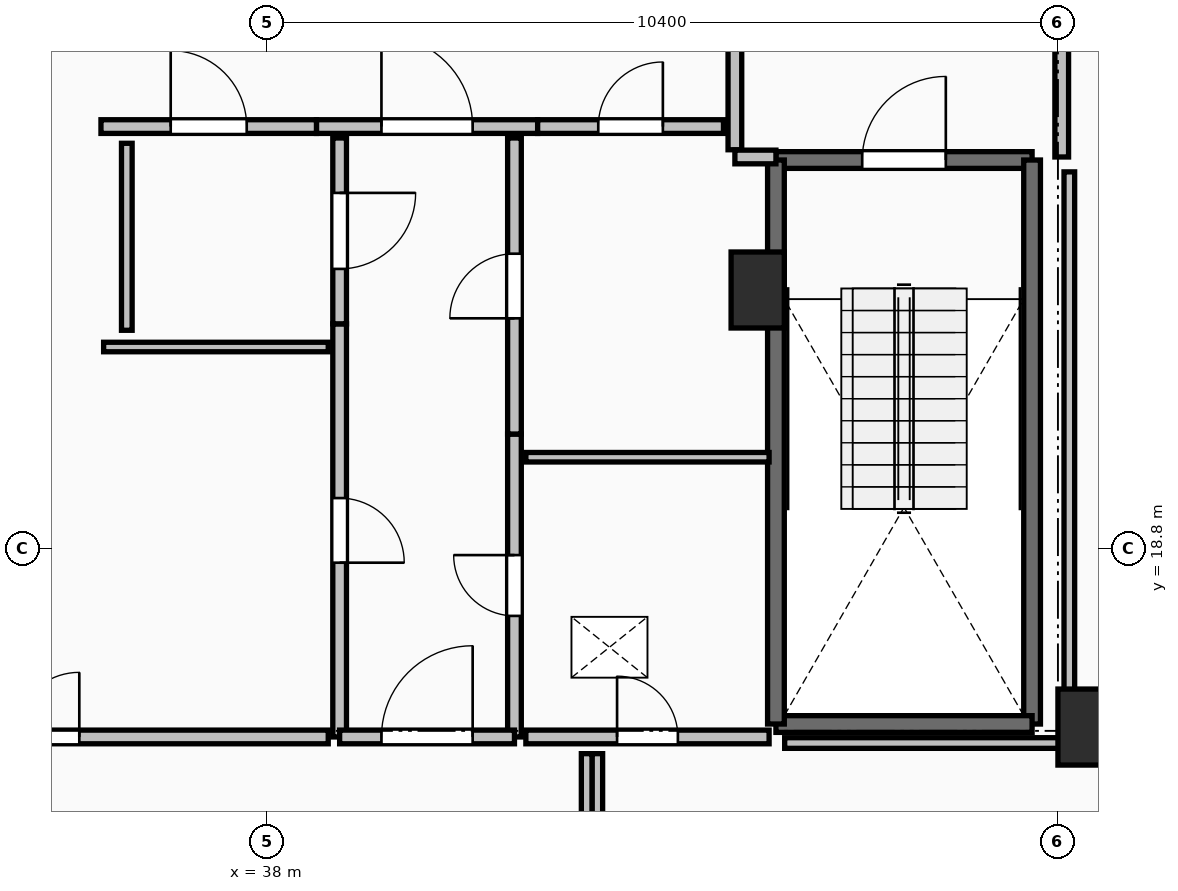
"""IFC4 building model, lengths in metres.
Left out: names, types, materials, properties, quantities, classifications, styles, units other than length and angle.
Written with IfcOpenShell. Run it as: python <this file> out.ifc"""

import sys

from ifc_helpers import new_model, si_unit, direction, frame, frame_2d, origin, origin_2d, place, context, subcontext, project, spatial, rectangle, extrude, element, fill, save


model = new_model("IFC4")
c1 = context("Model", 3, precision=1e-05, world=origin(), true_north=direction((0.0, 1.0)))
c2 = subcontext(c1, "Body", "Model", "MODEL_VIEW")
j1 = project(units=[si_unit("LENGTHUNIT", "METRE"), si_unit("PLANEANGLEUNIT", "RADIAN")], contexts=[c1])
p1 = place(None, origin())
s1 = spatial("IfcSite", under=j1, at=p1, CompositionType="ELEMENT")
p2 = place(p1, origin())
s2 = spatial("IfcBuilding", under=s1, at=p2, CompositionType="ELEMENT")
p3 = place(p2, frame((0.0, 0.0, 269.75)))
s3 = spatial("IfcBuildingStorey", under=s2, at=p3, CompositionType="ELEMENT", Elevation=269.75)
for number, where, z_axis, x_axis in (
    (1, (48.75, 16.45, 0.0), (0.0, 0.0, 1.0), (1.0, 0.0, 0.0)),
    (2, (44.45, 22.2, 0.0), (0.0, 0.0, 1.0), (1.0, 0.0, 0.0)),
):
    element("IfcColumn", number, at=place(p3, frame(where, z_axis=z_axis, x_axis=x_axis)), inside=s3, PredefinedType="PILASTER", context=c2, shape_type="SweptSolid", body=[
        extrude(rectangle(XDim=0.7, YDim=1.0, at=origin_2d()), origin(), (0.0, 0.0, 1.0), 3.55),
    ])
p4 = place(p3, frame((44.69, 23.91, 0.0), z_axis=(0.0, 0.0, 1.0), x_axis=(1.0, 0.0, 0.0)))
e3 = element("IfcWall", 3, at=p4, inside=s3, PredefinedType="SOLIDWALL", context=c2, shape_type="SweptSolid", body=[
    extrude(rectangle(XDim=3.37, YDim=0.22, at=frame_2d((1.685, 0.0))), origin(), (0.0, 0.0, 1.0), 3.29),
])
p5 = place(p4, frame((1.135, 0.0, 0.0)))
e4 = element("IfcOpeningElement", 4, at=p5, cuts=e3, PredefinedType="OPENING", context=c2, shape_type="SweptSolid", body=[
    extrude(rectangle(XDim=1.1, YDim=2.15, at=frame_2d((0.55, 1.075))), frame((0.0, 0.125, 0.0), z_axis=(0.0, -1.0, 0.0), x_axis=(1.0, 0.0, 0.0)), (0.0, 0.0, 1.0), 0.25),
])
p6 = place(p3, frame((48.06, 23.91, 0.0), z_axis=(0.0, 0.0, 1.0), x_axis=(0.0, -1.0, 0.0)))
e5 = element("IfcWall", 5, at=p6, inside=s3, PredefinedType="SOLIDWALL", context=c2, shape_type="SweptSolid", body=[
    extrude(rectangle(XDim=7.42, YDim=0.22, at=frame_2d((3.71, 0.0))), origin(), (0.0, 0.0, 1.0), 3.29),
])
p7 = place(p3, frame((48.06, 16.49, 0.0), z_axis=(0.0, 0.0, 1.0), x_axis=(-1.0, 0.0, 0.0)))
e6 = element("IfcWall", 6, at=p7, inside=s3, PredefinedType="SOLIDWALL", context=c2, shape_type="SweptSolid", body=[
    extrude(rectangle(XDim=3.37, YDim=0.22, at=frame_2d((1.685, 0.0))), origin(), (0.0, 0.0, 1.0), 3.29),
])
p8 = place(p3, frame((44.69, 16.49, 0.0), z_axis=(0.0, 0.0, 1.0), x_axis=(0.0, 1.0, 0.0)))
e7 = element("IfcWall", 7, at=p8, inside=s3, PredefinedType="SOLIDWALL", context=c2, shape_type="SweptSolid", body=[
    extrude(rectangle(XDim=7.42, YDim=0.22, at=frame_2d((3.71, 0.0))), origin(), (0.0, 0.0, 1.0), 3.29),
])
p9 = place(p3, frame((44.15, 27.955, 0.0), z_axis=(0.0, 0.0, 1.0), x_axis=(0.0, -1.0, 0.0)))
e8 = element("IfcWall", 8, at=p9, inside=s3, PredefinedType="PARTITIONING", context=c2, shape_type="SweptSolid", body=[
    extrude(rectangle(XDim=3.91, YDim=0.18, at=frame_2d((1.955, 0.0))), origin(), (0.0, 0.0, 1.0), 3.29),
])
p10 = place(p9, frame((1.355, 0.0, 0.0)))
e9 = element("IfcOpeningElement", 9, at=p10, cuts=e8, PredefinedType="OPENING", context=c2, shape_type="SweptSolid", body=[
    extrude(rectangle(XDim=1.2, YDim=2.15, at=frame_2d((0.6, 1.075))), frame((0.0, 0.105, 0.0), z_axis=(0.0, -1.0, 0.0), x_axis=(1.0, 0.0, 0.0)), (0.0, 0.0, 1.0), 0.21),
])
p11 = place(p3, frame((44.15, 23.95, 0.0), z_axis=(0.0, 0.0, 1.0), x_axis=(1.0, 0.0, 0.0)))
e10 = element("IfcWall", 10, at=p11, inside=s3, PredefinedType="PARTITIONING", context=c2, shape_type="SweptSolid", body=[
    extrude(rectangle(XDim=0.54, YDim=0.18, at=frame_2d((0.27, 0.0))), origin(), (0.0, 0.0, 1.0), 3.29),
])
p12 = place(p3, frame((48.45, 23.95, 0.0), z_axis=(0.0, 0.0, 1.0), x_axis=(0.0, 1.0, 0.0)))
e11 = element("IfcWall", 11, at=p12, inside=s3, PredefinedType="PARTITIONING", context=c2, shape_type="SweptSolid", body=[
    extrude(rectangle(XDim=4.05, YDim=0.18, at=frame_2d((2.025, 0.0))), origin(), (0.0, 0.0, 1.0), 3.29),
])
p13 = place(p12, frame((1.425, 0.0, 0.0)))
e12 = element("IfcOpeningElement", 12, at=p13, cuts=e11, PredefinedType="OPENING", context=c2, shape_type="SweptSolid", body=[
    extrude(rectangle(XDim=1.2, YDim=2.15, at=frame_2d((0.6, 1.075))), frame((0.0, 0.105, 0.0), z_axis=(0.0, -1.0, 0.0), x_axis=(1.0, 0.0, 0.0)), (0.0, 0.0, 1.0), 0.21),
])
p14 = place(p3, frame((38.645, 24.35, 0.0), z_axis=(0.0, 0.0, 1.0), x_axis=(1.0, 0.0, 0.0)))
e13 = element("IfcWall", 13, at=p14, inside=s3, PredefinedType="PARTITIONING", context=c2, shape_type="SweptSolid", body=[
    extrude(rectangle(XDim=2.91, YDim=0.18, at=frame_2d((1.455, 0.0))), origin(), (0.0, 0.0, 1.0), 3.29),
])
p15 = place(p14, frame((0.855, 0.0, 0.0)))
e14 = element("IfcOpeningElement", 14, at=p15, cuts=e13, PredefinedType="OPENING", context=c2, shape_type="SweptSolid", body=[
    extrude(rectangle(XDim=1.2, YDim=2.15, at=frame_2d((0.6, 1.075))), frame((0.0, 0.105, 0.0), z_axis=(0.0, -1.0, 0.0), x_axis=(1.0, 0.0, 0.0)), (0.0, 0.0, 1.0), 0.21),
])
p16 = place(p3, frame((41.555, 24.35, 0.0), z_axis=(0.0, 0.0, 1.0), x_axis=(1.0, 0.0, 0.0)))
e15 = element("IfcWall", 15, at=p16, inside=s3, PredefinedType="PARTITIONING", context=c2, shape_type="SweptSolid", body=[
    extrude(rectangle(XDim=2.445, YDim=0.18, at=frame_2d((1.223, 0.0))), origin(), (0.0, 0.0, 1.0), 3.29),
])
p17 = place(p16, frame((0.798, 0.0, 0.0)))
e16 = element("IfcOpeningElement", 16, at=p17, cuts=e15, PredefinedType="OPENING", context=c2, shape_type="SweptSolid", body=[
    extrude(rectangle(XDim=0.85, YDim=2.1, at=frame_2d((0.425, 1.05))), frame((0.0, 0.105, 0.0), z_axis=(0.0, -1.0, 0.0), x_axis=(1.0, 0.0, 0.0)), (0.0, 0.0, 1.0), 0.21),
])
p18 = place(p3, frame((35.81, 24.35, 0.0), z_axis=(0.0, 0.0, 1.0), x_axis=(1.0, 0.0, 0.0)))
e17 = element("IfcWall", 17, at=p18, inside=s3, PredefinedType="PARTITIONING", context=c2, shape_type="SweptSolid", body=[
    extrude(rectangle(XDim=2.835, YDim=0.18, at=frame_2d((1.417, 0.0))), origin(), (0.0, 0.0, 1.0), 3.29),
])
p19 = place(p18, frame((0.917, 0.0, 0.0)))
e18 = element("IfcOpeningElement", 18, at=p19, cuts=e17, PredefinedType="OPENING", context=c2, shape_type="SweptSolid", body=[
    extrude(rectangle(XDim=1.0, YDim=2.15, at=frame_2d((0.5, 1.075))), frame((0.0, 0.105, 0.0), z_axis=(0.0, -1.0, 0.0), x_axis=(1.0, 0.0, 0.0)), (0.0, 0.0, 1.0), 0.21),
])
p20 = place(p3, frame((41.25, 16.32, 0.0), z_axis=(0.0, 0.0, 1.0), x_axis=(0.0, 1.0, 0.0)))
e19 = element("IfcWall", 19, at=p20, inside=s3, PredefinedType="PARTITIONING", context=c2, shape_type="SweptSolid", body=[
    extrude(rectangle(XDim=3.985, YDim=0.18, at=frame_2d((1.992, 0.0))), origin(), (0.0, 0.0, 1.0), 3.29),
])
p21 = place(p20, frame((1.593, 0.0, 0.0)))
e20 = element("IfcOpeningElement", 20, at=p21, cuts=e19, PredefinedType="OPENING", context=c2, shape_type="SweptSolid", body=[
    extrude(rectangle(XDim=0.8, YDim=2.05, at=frame_2d((0.4, 1.025))), frame((0.0, 0.105, 0.0), z_axis=(0.0, -1.0, 0.0), x_axis=(1.0, 0.0, 0.0)), (0.0, 0.0, 1.0), 0.21),
])
p22 = place(p3, frame((41.25, 20.305, 0.0), z_axis=(0.0, 0.0, 1.0), x_axis=(0.0, 1.0, 0.0)))
e21 = element("IfcWall", 21, at=p22, inside=s3, PredefinedType="PARTITIONING", context=c2, shape_type="SweptSolid", body=[
    extrude(rectangle(XDim=3.895, YDim=0.18, at=frame_2d((1.948, 0.0))), origin(), (0.0, 0.0, 1.0), 2.482),
])
p23 = place(p22, frame((1.522, 0.0, 0.0)))
e22 = element("IfcOpeningElement", 22, at=p23, cuts=e21, PredefinedType="OPENING", context=c2, shape_type="SweptSolid", body=[
    extrude(rectangle(XDim=0.85, YDim=2.1, at=frame_2d((0.425, 1.05))), frame((0.0, 0.105, 0.0), z_axis=(0.0, -1.0, 0.0), x_axis=(1.0, 0.0, 0.0)), (0.0, 0.0, 1.0), 0.21),
])
p24 = place(p3, frame((38.95, 21.755, 0.0), z_axis=(0.0, 0.0, 1.0), x_axis=(0.0, -1.0, 0.0)))
e23 = element("IfcWall", 23, at=p24, inside=s3, PredefinedType="PARTITIONING", context=c2, shape_type="SweptSolid", body=[
    extrude(rectangle(XDim=5.435, YDim=0.18, at=frame_2d((2.717, 0.0))), origin(), (0.0, 0.0, 1.0), 3.29),
])
p25 = place(p24, frame((2.292, 0.0, 0.0)))
e24 = element("IfcOpeningElement", 24, at=p25, cuts=e23, PredefinedType="OPENING", context=c2, shape_type="SweptSolid", body=[
    extrude(rectangle(XDim=0.85, YDim=2.1, at=frame_2d((0.425, 1.05))), frame((0.0, 0.105, 0.0), z_axis=(0.0, -1.0, 0.0), x_axis=(1.0, 0.0, 0.0)), (0.0, 0.0, 1.0), 0.21),
])
p26 = place(p3, frame((38.95, 24.2, 0.0), z_axis=(0.0, 0.0, 1.0), x_axis=(0.0, -1.0, 0.0)))
e25 = element("IfcWall", 25, at=p26, inside=s3, PredefinedType="PARTITIONING", context=c2, shape_type="SweptSolid", body=[
    extrude(rectangle(XDim=2.445, YDim=0.18, at=frame_2d((1.223, 0.0))), origin(), (0.0, 0.0, 1.0), 2.482),
])
p27 = place(p26, frame((0.722, 0.0, 0.0)))
e26 = element("IfcOpeningElement", 26, at=p27, cuts=e25, PredefinedType="OPENING", context=c2, shape_type="SweptSolid", body=[
    extrude(rectangle(XDim=1.0, YDim=2.15, at=frame_2d((0.5, 1.075))), frame((0.0, 0.105, 0.0), z_axis=(0.0, -1.0, 0.0), x_axis=(1.0, 0.0, 0.0)), (0.0, 0.0, 1.0), 0.21),
])
p28 = place(p3, frame((38.95, 16.32, 0.0), z_axis=(0.0, 0.0, 1.0), x_axis=(1.0, 0.0, 0.0)))
e27 = element("IfcWall", 27, at=p28, inside=s3, PredefinedType="PARTITIONING", context=c2, shape_type="SweptSolid", body=[
    extrude(rectangle(XDim=2.3, YDim=0.18, at=frame_2d((1.15, 0.0))), origin(), (0.0, 0.0, 1.0), 3.29),
])
p29 = place(p28, frame((0.55, 0.0, 0.0)))
e28 = element("IfcOpeningElement", 28, at=p29, cuts=e27, PredefinedType="OPENING", context=c2, shape_type="SweptSolid", body=[
    extrude(rectangle(XDim=1.2, YDim=2.15, at=frame_2d((0.6, 1.075))), frame((0.0, 0.105, 0.0), z_axis=(0.0, -1.0, 0.0), x_axis=(1.0, 0.0, 0.0)), (0.0, 0.0, 1.0), 0.21),
])
p30 = place(p3, frame((44.6, 20.0, 0.0), z_axis=(0.0, 0.0, 1.0), x_axis=(-1.0, 0.0, 0.0)))
e29 = element("IfcWall", 29, at=p30, inside=s3, PredefinedType="PARTITIONING", context=c2, shape_type="SweptSolid", body=[
    extrude(rectangle(XDim=3.2, YDim=0.125, at=frame_2d((1.6, 0.0))), origin(), (0.0, 0.0, 1.0), 3.29),
])
p31 = place(p3, frame((41.4, 16.32, 0.0), z_axis=(0.0, 0.0, 1.0), x_axis=(1.0, 0.0, 0.0)))
e30 = element("IfcWall", 30, at=p31, inside=s3, PredefinedType="PARTITIONING", context=c2, shape_type="SweptSolid", body=[
    extrude(rectangle(XDim=3.2, YDim=0.18, at=frame_2d((1.6, 0.0))), origin(), (0.0, 0.0, 1.0), 3.29),
])
p32 = place(p31, frame((1.2, 0.0, 0.0)))
e31 = element("IfcOpeningElement", 31, at=p32, cuts=e30, PredefinedType="OPENING", context=c2, shape_type="SweptSolid", body=[
    extrude(rectangle(XDim=0.8, YDim=2.05, at=frame_2d((0.4, 1.025))), frame((0.0, 0.105, 0.0), z_axis=(0.0, -1.0, 0.0), x_axis=(1.0, 0.0, 0.0)), (0.0, 0.0, 1.0), 0.21),
])
p33 = place(p3, frame((38.8, 21.45, 0.0), z_axis=(0.0, 0.0, 1.0), x_axis=(-1.0, 0.0, 0.0)))
e32 = element("IfcWall", 32, at=p33, inside=s3, PredefinedType="PARTITIONING", context=c2, shape_type="SweptSolid", body=[
    extrude(rectangle(XDim=2.955, YDim=0.125, at=frame_2d((1.478, 0.0))), origin(), (0.0, 0.0, 1.0), 3.29),
])
p34 = place(p3, frame((31.4, 16.32, 0.0), z_axis=(0.0, 0.0, 1.0), x_axis=(1.0, 0.0, 0.0)))
e33 = element("IfcWall", 33, at=p34, inside=s3, PredefinedType="PARTITIONING", context=c2, shape_type="SweptSolid", body=[
    extrude(rectangle(XDim=7.4, YDim=0.18, at=frame_2d((3.7, 0.0))), origin(), (0.0, 0.0, 1.0), 3.29),
])
p35 = place(p34, frame((3.275, 0.0, 0.0)))
e34 = element("IfcOpeningElement", 34, at=p35, cuts=e33, PredefinedType="OPENING", context=c2, shape_type="SweptSolid", body=[
    extrude(rectangle(XDim=0.85, YDim=2.1, at=frame_2d((0.425, 1.05))), frame((0.0, 0.105, 0.0), z_axis=(0.0, -1.0, 0.0), x_axis=(1.0, 0.0, 0.0)), (0.0, 0.0, 1.0), 0.21),
])
p36 = place(p3, frame((36.15, 24.13, 0.0), z_axis=(0.0, 0.0, 1.0), x_axis=(0.0, -1.0, 0.0)))
e35 = element("IfcWall", 35, at=p36, inside=s3, PredefinedType="PARTITIONING", context=c2, shape_type="SweptSolid", body=[
    extrude(rectangle(XDim=2.46, YDim=0.14, at=frame_2d((1.23, 0.0))), origin(), (0.0, 0.0, 1.0), 2.482),
])
p37 = place(p3, frame((42.34, 14.27, 0.0), z_axis=(0.0, 0.0, 1.0), x_axis=(0.0, 1.0, 0.0)))
e36 = element("IfcWall", 36, at=p37, inside=s3, PredefinedType="PARTITIONING", context=c2, shape_type="SweptSolid", body=[
    extrude(rectangle(XDim=1.83, YDim=0.14, at=frame_2d((0.915, 0.0))), origin(), (0.0, 0.0, 1.0), 3.29),
])
p38 = place(p3, frame((44.805, 16.24, 0.0), z_axis=(0.0, 0.0, 1.0), x_axis=(1.0, 0.0, 0.0)))
e37 = element("IfcWall", 37, at=p38, inside=s3, PredefinedType="PARTITIONING", context=c2, shape_type="SweptSolid", body=[
    extrude(rectangle(XDim=3.745, YDim=0.14, at=frame_2d((1.873, 0.0))), origin(), (0.0, 0.0, 1.0), 2.482),
])
p39 = place(p3, frame((48.55, 16.24, 0.0), z_axis=(0.0, 0.0, 1.0), x_axis=(0.0, 1.0, 0.0)))
e38 = element("IfcWall", 38, at=p39, inside=s3, PredefinedType="PARTITIONING", context=c2, shape_type="SweptSolid", body=[
    extrude(rectangle(XDim=7.514, YDim=0.14, at=frame_2d((3.757, 0.0))), origin(), (0.0, 0.0, 1.0), 2.482),
])
p40 = place(p3, frame((42.2, 16.1, 0.0), z_axis=(0.0, 0.0, 1.0), x_axis=(0.0, -1.0, 0.0)))
e39 = element("IfcWall", 39, at=p40, inside=s3, PredefinedType="PARTITIONING", context=c2, shape_type="SweptSolid", body=[
    extrude(rectangle(XDim=1.83, YDim=0.14, at=frame_2d((0.915, 0.0))), origin(), (0.0, 0.0, 1.0), 3.29),
])
p41 = place(p5, origin())
e40 = element("IfcDoor", 40, at=p41, inside=s3, OperationType="SINGLE_SWING_RIGHT", PredefinedType="DOOR", context=c2, shape_type="SweptSolid", body=[
    extrude(rectangle(XDim=1.1, YDim=2.15, at=frame_2d((0.55, 1.075))), frame((0.0, 0.025, 0.0), z_axis=(0.0, -1.0, 0.0), x_axis=(1.0, 0.0, 0.0)), (0.0, 0.0, 1.0), 0.05),
])
fill(e4, e40)
p42 = place(p15, origin())
e41 = element("IfcDoor", 41, at=p42, inside=s3, OperationType="SINGLE_SWING_LEFT", PredefinedType="DOOR", context=c2, shape_type="SweptSolid", body=[
    extrude(rectangle(XDim=1.2, YDim=2.15, at=frame_2d((0.6, 1.075))), frame((0.0, 0.025, 0.0), z_axis=(0.0, -1.0, 0.0), x_axis=(1.0, 0.0, 0.0)), (0.0, 0.0, 1.0), 0.05),
])
fill(e14, e41)
p43 = place(p17, origin())
e42 = element("IfcDoor", 42, at=p43, inside=s3, OperationType="SINGLE_SWING_RIGHT", PredefinedType="DOOR", context=c2, shape_type="SweptSolid", body=[
    extrude(rectangle(XDim=0.85, YDim=2.1, at=frame_2d((0.425, 1.05))), frame((0.0, 0.025, 0.0), z_axis=(0.0, -1.0, 0.0), x_axis=(1.0, 0.0, 0.0)), (0.0, 0.0, 1.0), 0.05),
])
fill(e16, e42)
p44 = place(p19, origin())
e43 = element("IfcDoor", 43, at=p44, inside=s3, OperationType="SINGLE_SWING_LEFT", PredefinedType="DOOR", context=c2, shape_type="SweptSolid", body=[
    extrude(rectangle(XDim=1.0, YDim=2.15, at=frame_2d((0.5, 1.075))), frame((0.0, 0.025, 0.0), z_axis=(0.0, -1.0, 0.0), x_axis=(1.0, 0.0, 0.0)), (0.0, 0.0, 1.0), 0.05),
])
fill(e18, e43)
p45 = place(p21, origin())
e44 = element("IfcDoor", 44, at=p45, inside=s3, OperationType="SINGLE_SWING_RIGHT", PredefinedType="DOOR", context=c2, shape_type="SweptSolid", body=[
    extrude(rectangle(XDim=0.8, YDim=2.05, at=frame_2d((0.4, 1.025))), frame((0.0, 0.025, 0.0), z_axis=(0.0, -1.0, 0.0), x_axis=(1.0, 0.0, 0.0)), (0.0, 0.0, 1.0), 0.05),
])
fill(e20, e44)
p46 = place(p23, origin())
e45 = element("IfcDoor", 45, at=p46, inside=s3, OperationType="SINGLE_SWING_LEFT", PredefinedType="DOOR", context=c2, shape_type="SweptSolid", body=[
    extrude(rectangle(XDim=0.85, YDim=2.1, at=frame_2d((0.425, 1.05))), frame((0.0, 0.025, 0.0), z_axis=(0.0, -1.0, 0.0), x_axis=(1.0, 0.0, 0.0)), (0.0, 0.0, 1.0), 0.05),
])
fill(e22, e45)
p47 = place(p25, origin())
e46 = element("IfcDoor", 46, at=p47, inside=s3, OperationType="SINGLE_SWING_RIGHT", PredefinedType="DOOR", context=c2, shape_type="SweptSolid", body=[
    extrude(rectangle(XDim=0.85, YDim=2.1, at=frame_2d((0.425, 1.05))), frame((0.0, 0.025, 0.0), z_axis=(0.0, -1.0, 0.0), x_axis=(1.0, 0.0, 0.0)), (0.0, 0.0, 1.0), 0.05),
])
fill(e24, e46)
p48 = place(p27, origin())
e47 = element("IfcDoor", 47, at=p48, inside=s3, OperationType="SINGLE_SWING_LEFT", PredefinedType="DOOR", context=c2, shape_type="SweptSolid", body=[
    extrude(rectangle(XDim=1.0, YDim=2.15, at=frame_2d((0.5, 1.075))), frame((0.0, 0.025, 0.0), z_axis=(0.0, -1.0, 0.0), x_axis=(1.0, 0.0, 0.0)), (0.0, 0.0, 1.0), 0.05),
])
fill(e26, e47)
p49 = place(p29, origin())
e48 = element("IfcDoor", 48, at=p49, inside=s3, OperationType="SINGLE_SWING_RIGHT", PredefinedType="DOOR", context=c2, shape_type="SweptSolid", body=[
    extrude(rectangle(XDim=1.2, YDim=2.15, at=frame_2d((0.6, 1.075))), frame((0.0, 0.025, 0.0), z_axis=(0.0, -1.0, 0.0), x_axis=(1.0, 0.0, 0.0)), (0.0, 0.0, 1.0), 0.05),
])
fill(e28, e48)
p50 = place(p32, origin())
e49 = element("IfcDoor", 49, at=p50, inside=s3, OperationType="SINGLE_SWING_LEFT", PredefinedType="DOOR", context=c2, shape_type="SweptSolid", body=[
    extrude(rectangle(XDim=0.8, YDim=2.05, at=frame_2d((0.4, 1.025))), frame((0.0, 0.025, 0.0), z_axis=(0.0, -1.0, 0.0), x_axis=(1.0, 0.0, 0.0)), (0.0, 0.0, 1.0), 0.05),
])
fill(e31, e49)
p51 = place(p35, origin())
e50 = element("IfcDoor", 50, at=p51, inside=s3, OperationType="SINGLE_SWING_RIGHT", PredefinedType="DOOR", context=c2, shape_type="SweptSolid", body=[
    extrude(rectangle(XDim=0.85, YDim=2.1, at=frame_2d((0.425, 1.05))), frame((0.0, 0.025, 0.0), z_axis=(0.0, -1.0, 0.0), x_axis=(1.0, 0.0, 0.0)), (0.0, 0.0, 1.0), 0.05),
])
fill(e34, e50)
save(model, sys.argv[1])
